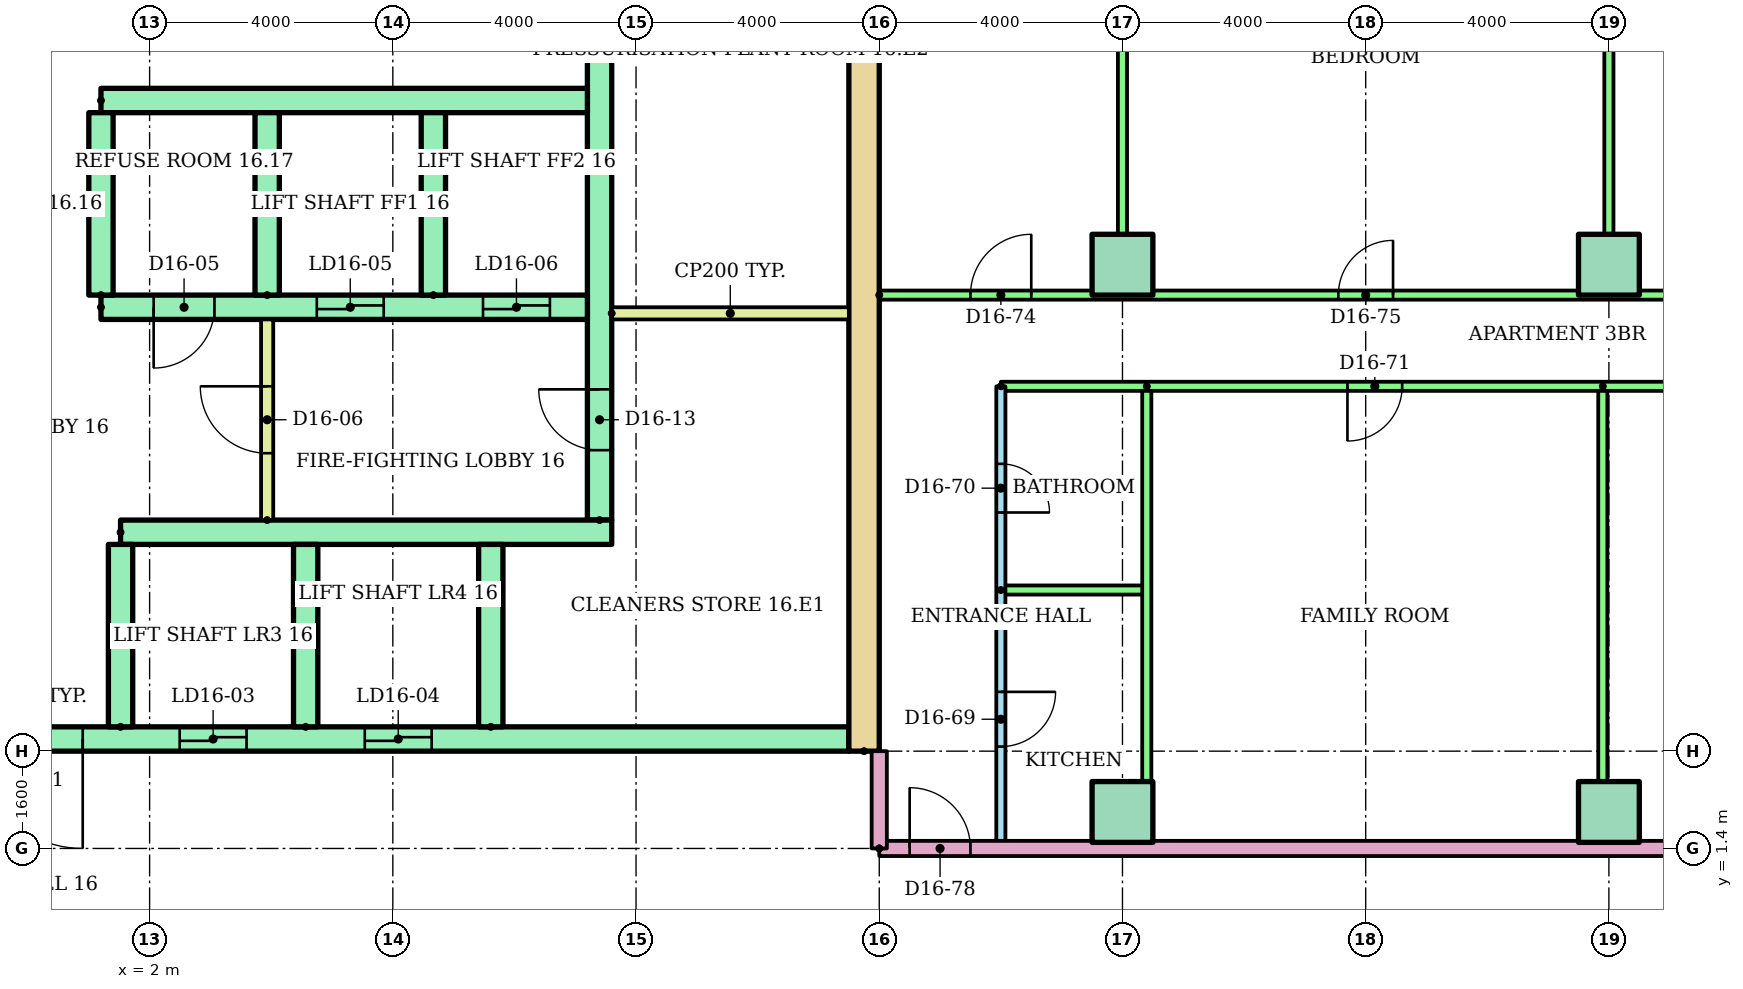
"""IFC4 building model, lengths in metres.
Left out: names, types, materials, properties, quantities, classifications, styles, units other than length and angle.
Written with IfcOpenShell. Run it as: python <this file> out.ifc"""

import sys

from ifc_helpers import new_model, si_unit, direction, frame, frame_2d, origin, origin_2d, place, context, subcontext, project, spatial, rectangle, extrude, element, fill, save


model = new_model("IFC4")
c1 = context("Model", 3, precision=1e-05, world=origin(), true_north=direction((0.0, 1.0)))
c2 = subcontext(c1, "Body", "Model", "MODEL_VIEW")
j1 = project(units=[si_unit("LENGTHUNIT", "METRE"), si_unit("PLANEANGLEUNIT", "RADIAN")], contexts=[c1])
p1 = place(None, origin())
s1 = spatial("IfcSite", under=j1, at=p1, CompositionType="ELEMENT")
p2 = place(p1, origin())
s2 = spatial("IfcBuilding", under=s1, at=p2, CompositionType="ELEMENT")
p3 = place(p2, frame((0.0, 0.0, 60.8)))
s3 = spatial("IfcBuildingStorey", under=s2, at=p3, CompositionType="ELEMENT", Elevation=60.8)
for number, where in (
    (1, (18.0, 2.0, 0.0)),
    (2, (26.0, 2.0, 0.0)),
    (3, (18.0, 11.0, 0.0)),
    (4, (26.0, 11.0, 0.0)),
):
    element("IfcColumn", number, at=place(p3, frame(where)), inside=s3, PredefinedType="COLUMN", context=c2, shape_type="SweptSolid", body=[
        extrude(rectangle(XDim=1.0, YDim=1.0, at=origin_2d()), origin(), (0.0, 0.0, 1.0), 3.2),
    ])
p4 = place(p3, frame((13.75, 3.0, 0.0), z_axis=(0.0, 0.0, 1.0), x_axis=(0.0, 1.0, 0.0)))
e5 = element("IfcWall", 5, at=p4, inside=s3, PredefinedType="SHEAR", context=c2, shape_type="SweptSolid", body=[
    extrude(rectangle(XDim=17.0, YDim=0.5, at=frame_2d((8.5, 0.0))), origin(), (0.0, 0.0, 1.0), 2.8),
])
p5 = place(p3, frame((9.4, 6.8, 0.0), z_axis=(0.0, 0.0, 1.0), x_axis=(0.0, 1.0, 0.0)))
e6 = element("IfcWall", 6, at=p5, inside=s3, PredefinedType="SHEAR", context=c2, shape_type="SweptSolid", body=[
    extrude(rectangle(XDim=12.7, YDim=0.4, at=frame_2d((6.35, 0.0))), origin(), (0.0, 0.0, 1.0), 2.8),
])
p6 = place(p5, frame((1.15, 0.0, 0.0)))
e7 = element("IfcOpeningElement", 7, at=p6, cuts=e6, PredefinedType="OPENING", context=c2, shape_type="SweptSolid", body=[
    extrude(rectangle(XDim=1.0, YDim=2.1, at=frame_2d((0.5, 1.05))), frame((0.0, 0.21, 0.0), z_axis=(0.0, -1.0, 0.0), x_axis=(1.0, 0.0, 0.0)), (0.0, 0.0, 1.0), 0.42),
])
p7 = place(p5, frame((7.925, 0.0, 0.0)))
e8 = element("IfcOpeningElement", 8, at=p7, cuts=e6, PredefinedType="OPENING", context=c2, shape_type="SweptSolid", body=[
    extrude(rectangle(XDim=1.0, YDim=2.1, at=frame_2d((0.5, 1.05))), frame((0.0, 0.21, 0.0), z_axis=(0.0, -1.0, 0.0), x_axis=(1.0, 0.0, 0.0)), (0.0, 0.0, 1.0), 0.42),
])
p8 = place(p3, frame((-13.5, 3.2, 0.0)))
e9 = element("IfcWall", 9, at=p8, inside=s3, PredefinedType="SHEAR", context=c2, shape_type="SweptSolid", body=[
    extrude(rectangle(XDim=27.0, YDim=0.4, at=frame_2d((13.5, 0.0))), origin(), (0.0, 0.0, 1.0), 2.8),
])
p9 = place(p8, frame((6.861, 0.0, 0.0)))
e10 = element("IfcOpeningElement", 10, at=p9, cuts=e9, PredefinedType="OPENING", context=c2, shape_type="SweptSolid", body=[
    extrude(rectangle(XDim=1.1, YDim=2.1, at=frame_2d((0.55, 1.05))), frame((0.0, 0.21, 0.0), z_axis=(0.0, -1.0, 0.0), x_axis=(1.0, 0.0, 0.0)), (0.0, 0.0, 1.0), 0.42),
])
p10 = place(p8, frame((9.906, 0.0, 0.0)))
e11 = element("IfcOpeningElement", 11, at=p10, cuts=e9, PredefinedType="OPENING", context=c2, shape_type="SweptSolid", body=[
    extrude(rectangle(XDim=1.1, YDim=2.1, at=frame_2d((0.55, 1.05))), frame((0.0, 0.21, 0.0), z_axis=(0.0, -1.0, 0.0), x_axis=(1.0, 0.0, 0.0)), (0.0, 0.0, 1.0), 0.42),
])
p11 = place(p8, frame((15.994, 0.0, 0.0)))
e12 = element("IfcOpeningElement", 12, at=p11, cuts=e9, PredefinedType="OPENING", context=c2, shape_type="SweptSolid", body=[
    extrude(rectangle(XDim=1.1, YDim=2.1, at=frame_2d((0.55, 1.05))), frame((0.0, 0.21, 0.0), z_axis=(0.0, -1.0, 0.0), x_axis=(1.0, 0.0, 0.0)), (0.0, 0.0, 1.0), 0.42),
])
p12 = place(p8, frame((19.039, 0.0, 0.0)))
e13 = element("IfcOpeningElement", 13, at=p12, cuts=e9, PredefinedType="OPENING", context=c2, shape_type="SweptSolid", body=[
    extrude(rectangle(XDim=1.1, YDim=2.1, at=frame_2d((0.55, 1.05))), frame((0.0, 0.21, 0.0), z_axis=(0.0, -1.0, 0.0), x_axis=(1.0, 0.0, 0.0)), (0.0, 0.0, 1.0), 0.42),
])
p13 = place(p8, frame((12.6, 0.0, 0.0)))
e14 = element("IfcOpeningElement", 14, at=p13, cuts=e9, PredefinedType="OPENING", context=c2, shape_type="SweptSolid", body=[
    extrude(rectangle(XDim=1.8, YDim=2.1, at=frame_2d((0.9, 1.05))), frame((0.0, 0.21, 0.0), z_axis=(0.0, -1.0, 0.0), x_axis=(1.0, 0.0, 0.0)), (0.0, 0.0, 1.0), 0.42),
])
p14 = place(p3, frame((1.522, 6.6, 0.0)))
e15 = element("IfcWall", 15, at=p14, inside=s3, PredefinedType="SHEAR", context=c2, shape_type="SweptSolid", body=[
    extrude(rectangle(XDim=8.078, YDim=0.4, at=frame_2d((4.039, 0.0))), origin(), (0.0, 0.0, 1.0), 2.8),
])
for number, where, z_axis, x_axis in (
    (16, (1.522, 3.4, 0.0), (0.0, 0.0, 1.0), (0.0, 1.0, 0.0)),
    (17, (4.567, 3.4, 0.0), (0.0, 0.0, 1.0), (0.0, 1.0, 0.0)),
    (18, (7.611, 3.4, 0.0), (0.0, 0.0, 1.0), (0.0, 1.0, 0.0)),
):
    element("IfcWall", number, at=place(p3, frame(where, z_axis=z_axis, x_axis=x_axis)), inside=s3, PredefinedType="SHEAR", context=c2, shape_type="SweptSolid", body=[
        extrude(rectangle(XDim=3.0, YDim=0.4, at=frame_2d((1.5, 0.0))), origin(), (0.0, 0.0, 1.0), 2.8),
    ])
p15 = place(p3, frame((1.2, 10.3, 0.0)))
e19 = element("IfcWall", 19, at=p15, inside=s3, PredefinedType="SHEAR", context=c2, shape_type="SweptSolid", body=[
    extrude(rectangle(XDim=8.0, YDim=0.4, at=frame_2d((4.0, 0.0))), origin(), (0.0, 0.0, 1.0), 2.8),
])
p16 = place(p15, frame((3.55, 0.0, 0.0)))
e20 = element("IfcOpeningElement", 20, at=p16, cuts=e19, PredefinedType="OPENING", context=c2, shape_type="SweptSolid", body=[
    extrude(rectangle(XDim=1.1, YDim=2.1, at=frame_2d((0.55, 1.05))), frame((0.0, 0.21, 0.0), z_axis=(0.0, -1.0, 0.0), x_axis=(1.0, 0.0, 0.0)), (0.0, 0.0, 1.0), 0.42),
])
p17 = place(p15, frame((6.283, 0.0, 0.0)))
e21 = element("IfcOpeningElement", 21, at=p17, cuts=e19, PredefinedType="OPENING", context=c2, shape_type="SweptSolid", body=[
    extrude(rectangle(XDim=1.1, YDim=2.1, at=frame_2d((0.55, 1.05))), frame((0.0, 0.21, 0.0), z_axis=(0.0, -1.0, 0.0), x_axis=(1.0, 0.0, 0.0)), (0.0, 0.0, 1.0), 0.42),
])
p18 = place(p15, frame((0.867, 0.0, 0.0)))
e22 = element("IfcOpeningElement", 22, at=p18, cuts=e19, PredefinedType="OPENING", context=c2, shape_type="SweptSolid", body=[
    extrude(rectangle(XDim=1.0, YDim=2.1, at=frame_2d((0.5, 1.05))), frame((0.0, 0.21, 0.0), z_axis=(0.0, -1.0, 0.0), x_axis=(1.0, 0.0, 0.0)), (0.0, 0.0, 1.0), 0.42),
])
p19 = place(p3, frame((1.2, 13.7, 0.0)))
e23 = element("IfcWall", 23, at=p19, inside=s3, PredefinedType="SHEAR", context=c2, shape_type="SweptSolid", body=[
    extrude(rectangle(XDim=8.0, YDim=0.4, at=frame_2d((4.0, 0.0))), origin(), (0.0, 0.0, 1.0), 2.8),
])
for number, where, z_axis, x_axis in (
    (24, (1.2, 10.5, 0.0), (0.0, 0.0, 1.0), (0.0, 1.0, 0.0)),
    (25, (3.933, 10.5, 0.0), (0.0, 0.0, 1.0), (0.0, 1.0, 0.0)),
    (26, (6.667, 10.5, 0.0), (0.0, 0.0, 1.0), (0.0, 1.0, 0.0)),
):
    element("IfcWall", number, at=place(p3, frame(where, z_axis=z_axis, x_axis=x_axis)), inside=s3, PredefinedType="SHEAR", context=c2, shape_type="SweptSolid", body=[
        extrude(rectangle(XDim=3.0, YDim=0.4, at=frame_2d((1.5, 0.0))), origin(), (0.0, 0.0, 1.0), 2.8),
    ])
p20 = place(p3, frame((3.933, 6.8, 0.0), z_axis=(0.0, 0.0, 1.0), x_axis=(0.0, 1.0, 0.0)))
e27 = element("IfcWall", 27, at=p20, inside=s3, PredefinedType="PARTITIONING", context=c2, shape_type="SweptSolid", body=[
    extrude(rectangle(XDim=3.3, YDim=0.2, at=frame_2d((1.65, 0.0))), origin(), (0.0, 0.0, 1.0), 2.8),
])
p21 = place(p20, frame((1.1, 0.0, 0.0)))
e28 = element("IfcOpeningElement", 28, at=p21, cuts=e27, PredefinedType="OPENING", context=c2, shape_type="SweptSolid", body=[
    extrude(rectangle(XDim=1.1, YDim=2.1, at=frame_2d((0.55, 1.05))), frame((0.0, 0.11, 0.0), z_axis=(0.0, -1.0, 0.0), x_axis=(1.0, 0.0, 0.0)), (0.0, 0.0, 1.0), 0.22),
])
p22 = place(p3, frame((9.6, 10.2, 0.0)))
e29 = element("IfcWall", 29, at=p22, inside=s3, PredefinedType="PARTITIONING", context=c2, shape_type="SweptSolid", body=[
    extrude(rectangle(XDim=3.9, YDim=0.2, at=frame_2d((1.95, 0.0))), origin(), (0.0, 0.0, 1.0), 2.8),
])
p23 = place(p3, frame((16.0, 9.0, 0.0), z_axis=(0.0, 0.0, 1.0), x_axis=(0.0, -1.0, 0.0)))
e30 = element("IfcWall", 30, at=p23, inside=s3, PredefinedType="PARTITIONING", context=c2, shape_type="SweptSolid", body=[
    extrude(rectangle(XDim=7.6, YDim=0.15, at=frame_2d((3.8, 0.0))), origin(), (0.0, 0.0, 1.0), 2.4),
])
p24 = place(p23, frame((5.025, 0.0, 0.0)))
e31 = element("IfcOpeningElement", 31, at=p24, cuts=e30, PredefinedType="OPENING", context=c2, shape_type="SweptSolid", body=[
    extrude(rectangle(XDim=0.9, YDim=2.1, at=frame_2d((0.45, 1.05))), frame((0.0, 0.085, 0.0), z_axis=(0.0, -1.0, 0.0), x_axis=(1.0, 0.0, 0.0)), (0.0, 0.0, 1.0), 0.17),
])
p25 = place(p23, frame((1.275, 0.0, 0.0)))
e32 = element("IfcOpeningElement", 32, at=p25, cuts=e30, PredefinedType="OPENING", context=c2, shape_type="SweptSolid", body=[
    extrude(rectangle(XDim=0.8, YDim=2.1, at=frame_2d((0.4, 1.05))), frame((0.0, 0.085, 0.0), z_axis=(0.0, -1.0, 0.0), x_axis=(1.0, 0.0, 0.0)), (0.0, 0.0, 1.0), 0.17),
])
p26 = place(p3, frame((16.0, 5.65, 0.0)))
e33 = element("IfcWall", 33, at=p26, inside=s3, PredefinedType="PARTITIONING", context=c2, shape_type="SweptSolid", body=[
    extrude(rectangle(XDim=2.4, YDim=0.15, at=frame_2d((1.2, 0.0))), origin(), (0.0, 0.0, 1.0), 2.4),
])
for number, where, z_axis, x_axis in (
    (34, (18.4, 9.0, 0.0), (0.0, 0.0, 1.0), (0.0, -1.0, 0.0)),
    (35, (25.9, 9.0, 0.0), (0.0, 0.0, 1.0), (0.0, -1.0, 0.0)),
):
    element("IfcWall", number, at=place(p3, frame(where, z_axis=z_axis, x_axis=x_axis)), inside=s3, PredefinedType="PARTITIONING", context=c2, shape_type="SweptSolid", body=[
        extrude(rectangle(XDim=7.6, YDim=0.15, at=frame_2d((3.8, 0.0))), origin(), (0.0, 0.0, 1.0), 2.4),
    ])
p27 = place(p3, frame((36.51, 9.0, 0.0), z_axis=(0.0, 0.0, 1.0), x_axis=(-1.0, 0.0, 0.0)))
e36 = element("IfcWall", 36, at=p27, inside=s3, PredefinedType="PARTITIONING", context=c2, shape_type="SweptSolid", body=[
    extrude(rectangle(XDim=20.51, YDim=0.15, at=frame_2d((10.255, 0.0))), origin(), (0.0, 0.0, 1.0), 2.4),
])
p28 = place(p27, frame((13.91, 0.0, 0.0)))
e37 = element("IfcOpeningElement", 37, at=p28, cuts=e36, PredefinedType="OPENING", context=c2, shape_type="SweptSolid", body=[
    extrude(rectangle(XDim=0.9, YDim=2.1, at=frame_2d((0.45, 1.05))), frame((0.0, 0.085, 0.0), z_axis=(0.0, -1.0, 0.0), x_axis=(1.0, 0.0, 0.0)), (0.0, 0.0, 1.0), 0.17),
])
p29 = place(p27, frame((7.16, 0.0, 0.0)))
e38 = element("IfcOpeningElement", 38, at=p29, cuts=e36, PredefinedType="OPENING", context=c2, shape_type="SweptSolid", body=[
    extrude(rectangle(XDim=0.9, YDim=2.1, at=frame_2d((0.45, 1.05))), frame((0.0, 0.085, 0.0), z_axis=(0.0, -1.0, 0.0), x_axis=(1.0, 0.0, 0.0)), (0.0, 0.0, 1.0), 0.17),
])
p30 = place(p27, frame((0.85, 0.0, 0.0)))
e39 = element("IfcOpeningElement", 39, at=p30, cuts=e36, PredefinedType="OPENING", context=c2, shape_type="SweptSolid", body=[
    extrude(rectangle(XDim=0.9, YDim=2.1, at=frame_2d((0.45, 1.05))), frame((0.0, 0.085, 0.0), z_axis=(0.0, -1.0, 0.0), x_axis=(1.0, 0.0, 0.0)), (0.0, 0.0, 1.0), 0.17),
])
p31 = place(p3, frame((14.0, 10.5, 0.0)))
e40 = element("IfcWall", 40, at=p31, inside=s3, PredefinedType="PARTITIONING", context=c2, shape_type="SweptSolid", body=[
    extrude(rectangle(XDim=22.51, YDim=0.15, at=frame_2d((11.255, 0.0))), origin(), (0.0, 0.0, 1.0), 2.4),
])
p32 = place(p31, frame((1.5, 0.0, 0.0)))
e41 = element("IfcOpeningElement", 41, at=p32, cuts=e40, PredefinedType="OPENING", context=c2, shape_type="SweptSolid", body=[
    extrude(rectangle(XDim=1.0, YDim=2.1, at=frame_2d((0.5, 1.05))), frame((0.0, 0.085, 0.0), z_axis=(0.0, -1.0, 0.0), x_axis=(1.0, 0.0, 0.0)), (0.0, 0.0, 1.0), 0.17),
])
p33 = place(p31, frame((7.55, 0.0, 0.0)))
e42 = element("IfcOpeningElement", 42, at=p33, cuts=e40, PredefinedType="OPENING", context=c2, shape_type="SweptSolid", body=[
    extrude(rectangle(XDim=0.9, YDim=2.1, at=frame_2d((0.45, 1.05))), frame((0.0, 0.085, 0.0), z_axis=(0.0, -1.0, 0.0), x_axis=(1.0, 0.0, 0.0)), (0.0, 0.0, 1.0), 0.17),
])
p34 = place(p31, frame((14.45, 0.0, 0.0)))
e43 = element("IfcOpeningElement", 43, at=p34, cuts=e40, PredefinedType="OPENING", context=c2, shape_type="SweptSolid", body=[
    extrude(rectangle(XDim=0.9, YDim=2.1, at=frame_2d((0.45, 1.05))), frame((0.0, 0.085, 0.0), z_axis=(0.0, -1.0, 0.0), x_axis=(1.0, 0.0, 0.0)), (0.0, 0.0, 1.0), 0.17),
])
p35 = place(p31, frame((20.76, 0.0, 0.0)))
e44 = element("IfcOpeningElement", 44, at=p35, cuts=e40, PredefinedType="OPENING", context=c2, shape_type="SweptSolid", body=[
    extrude(rectangle(XDim=0.9, YDim=2.1, at=frame_2d((0.45, 1.05))), frame((0.0, 0.085, 0.0), z_axis=(0.0, -1.0, 0.0), x_axis=(1.0, 0.0, 0.0)), (0.0, 0.0, 1.0), 0.17),
])
for number, where, z_axis, x_axis in (
    (45, (18.0, 18.521, 0.0), (0.0, 0.0, 1.0), (0.0, -1.0, 0.0)),
    (46, (26.0, 18.521, 0.0), (0.0, 0.0, 1.0), (0.0, -1.0, 0.0)),
):
    element("IfcWall", number, at=place(p3, frame(where, z_axis=z_axis, x_axis=x_axis)), inside=s3, PredefinedType="PARTITIONING", context=c2, shape_type="SweptSolid", body=[
        extrude(rectangle(XDim=8.021, YDim=0.15, at=frame_2d((4.01, 0.0))), origin(), (0.0, 0.0, 1.0), 2.4),
    ])
p36 = place(p3, frame((14.0, 1.4, 0.0)))
e47 = element("IfcWall", 47, at=p36, inside=s3, PredefinedType="PARTITIONING", context=c2, shape_type="SweptSolid", body=[
    extrude(rectangle(XDim=15.0, YDim=0.25, at=frame_2d((7.5, 0.0))), origin(), (0.0, 0.0, 1.0), 2.4),
])
p37 = place(p36, frame((0.5, 0.0, 0.0)))
e48 = element("IfcOpeningElement", 48, at=p37, cuts=e47, PredefinedType="OPENING", context=c2, shape_type="SweptSolid", body=[
    extrude(rectangle(XDim=1.0, YDim=2.1, at=frame_2d((0.5, 1.05))), frame((0.0, 0.135, 0.0), z_axis=(0.0, -1.0, 0.0), x_axis=(1.0, 0.0, 0.0)), (0.0, 0.0, 1.0), 0.27),
])
p38 = place(p3, frame((14.0, 1.4, 0.0), z_axis=(0.0, 0.0, 1.0), x_axis=(0.0, 1.0, 0.0)))
e49 = element("IfcWall", 49, at=p38, inside=s3, PredefinedType="PARTITIONING", context=c2, shape_type="SweptSolid", body=[
    extrude(rectangle(XDim=1.6, YDim=0.25, at=frame_2d((0.8, 0.0))), origin(), (0.0, 0.0, 1.0), 2.4),
])
p39 = place(p11, origin())
e50 = element("IfcDoor", 50, at=p39, inside=s3, OperationType="SLIDING_TO_LEFT", PredefinedType="DOOR", context=c2, shape_type="SweptSolid", body=[
    extrude(rectangle(XDim=1.1, YDim=2.1, at=frame_2d((0.55, 1.05))), frame((0.0, 0.025, 0.0), z_axis=(0.0, -1.0, 0.0), x_axis=(1.0, 0.0, 0.0)), (0.0, 0.0, 1.0), 0.05),
])
fill(e12, e50)
p40 = place(p12, origin())
e51 = element("IfcDoor", 51, at=p40, inside=s3, OperationType="SLIDING_TO_LEFT", PredefinedType="DOOR", context=c2, shape_type="SweptSolid", body=[
    extrude(rectangle(XDim=1.1, YDim=2.1, at=frame_2d((0.55, 1.05))), frame((0.0, 0.025, 0.0), z_axis=(0.0, -1.0, 0.0), x_axis=(1.0, 0.0, 0.0)), (0.0, 0.0, 1.0), 0.05),
])
fill(e13, e51)
p41 = place(p13, frame((1.8, 0.0, 0.0), z_axis=(0.0, 0.0, 1.0), x_axis=(-1.0, 0.0, 0.0)))
e52 = element("IfcDoor", 52, at=p41, inside=s3, OperationType="DOUBLE_DOOR_SINGLE_SWING", PredefinedType="DOOR", context=c2, shape_type="SweptSolid", body=[
    extrude(rectangle(XDim=1.8, YDim=2.1, at=frame_2d((0.9, 1.05))), frame((0.0, 0.025, 0.0), z_axis=(0.0, -1.0, 0.0), x_axis=(1.0, 0.0, 0.0)), (0.0, 0.0, 1.0), 0.05),
])
fill(e14, e52)
p42 = place(p16, origin())
e53 = element("IfcDoor", 53, at=p42, inside=s3, OperationType="SLIDING_TO_LEFT", PredefinedType="DOOR", context=c2, shape_type="SweptSolid", body=[
    extrude(rectangle(XDim=1.1, YDim=2.1, at=frame_2d((0.55, 1.05))), frame((0.0, 0.025, 0.0), z_axis=(0.0, -1.0, 0.0), x_axis=(1.0, 0.0, 0.0)), (0.0, 0.0, 1.0), 0.05),
])
fill(e20, e53)
p43 = place(p17, origin())
e54 = element("IfcDoor", 54, at=p43, inside=s3, OperationType="SLIDING_TO_LEFT", PredefinedType="DOOR", context=c2, shape_type="SweptSolid", body=[
    extrude(rectangle(XDim=1.1, YDim=2.1, at=frame_2d((0.55, 1.05))), frame((0.0, 0.025, 0.0), z_axis=(0.0, -1.0, 0.0), x_axis=(1.0, 0.0, 0.0)), (0.0, 0.0, 1.0), 0.05),
])
fill(e21, e54)
p44 = place(p18, frame((1.0, 0.0, 0.0), z_axis=(0.0, 0.0, 1.0), x_axis=(-1.0, 0.0, 0.0)))
e55 = element("IfcDoor", 55, at=p44, inside=s3, OperationType="SINGLE_SWING_LEFT", PredefinedType="DOOR", context=c2, shape_type="SweptSolid", body=[
    extrude(rectangle(XDim=1.0, YDim=2.1, at=frame_2d((0.5, 1.05))), frame((0.0, 0.025, 0.0), z_axis=(0.0, -1.0, 0.0), x_axis=(1.0, 0.0, 0.0)), (0.0, 0.0, 1.0), 0.05),
])
fill(e22, e55)
p45 = place(p21, origin())
e56 = element("IfcDoor", 56, at=p45, inside=s3, OperationType="SINGLE_SWING_RIGHT", PredefinedType="DOOR", context=c2, shape_type="SweptSolid", body=[
    extrude(rectangle(XDim=1.1, YDim=2.1, at=frame_2d((0.55, 1.05))), frame((0.0, 0.025, 0.0), z_axis=(0.0, -1.0, 0.0), x_axis=(1.0, 0.0, 0.0)), (0.0, 0.0, 1.0), 0.05),
])
fill(e28, e56)
p46 = place(p6, origin())
e57 = element("IfcDoor", 57, at=p46, inside=s3, OperationType="SINGLE_SWING_RIGHT", PredefinedType="DOOR", context=c2, shape_type="SweptSolid", body=[
    extrude(rectangle(XDim=1.0, YDim=2.1, at=frame_2d((0.5, 1.05))), frame((0.0, 0.025, 0.0), z_axis=(0.0, -1.0, 0.0), x_axis=(1.0, 0.0, 0.0)), (0.0, 0.0, 1.0), 0.05),
])
fill(e7, e57)
p47 = place(p24, origin())
e58 = element("IfcDoor", 58, at=p47, inside=s3, OperationType="SINGLE_SWING_LEFT", PredefinedType="DOOR", context=c2, shape_type="SweptSolid", body=[
    extrude(rectangle(XDim=0.9, YDim=2.1, at=frame_2d((0.45, 1.05))), frame((0.0, 0.025, 0.0), z_axis=(0.0, -1.0, 0.0), x_axis=(1.0, 0.0, 0.0)), (0.0, 0.0, 1.0), 0.05),
])
fill(e31, e58)
p48 = place(p25, origin())
e59 = element("IfcDoor", 59, at=p48, inside=s3, OperationType="SINGLE_SWING_RIGHT", PredefinedType="DOOR", context=c2, shape_type="SweptSolid", body=[
    extrude(rectangle(XDim=0.8, YDim=2.1, at=frame_2d((0.4, 1.05))), frame((0.0, 0.025, 0.0), z_axis=(0.0, -1.0, 0.0), x_axis=(1.0, 0.0, 0.0)), (0.0, 0.0, 1.0), 0.05),
])
fill(e32, e59)
p49 = place(p28, origin())
e60 = element("IfcDoor", 60, at=p49, inside=s3, OperationType="SINGLE_SWING_RIGHT", PredefinedType="DOOR", context=c2, shape_type="SweptSolid", body=[
    extrude(rectangle(XDim=0.9, YDim=2.1, at=frame_2d((0.45, 1.05))), frame((0.0, 0.025, 0.0), z_axis=(0.0, -1.0, 0.0), x_axis=(1.0, 0.0, 0.0)), (0.0, 0.0, 1.0), 0.05),
])
fill(e37, e60)
p50 = place(p32, origin())
e61 = element("IfcDoor", 61, at=p50, inside=s3, OperationType="SINGLE_SWING_RIGHT", PredefinedType="DOOR", context=c2, shape_type="SweptSolid", body=[
    extrude(rectangle(XDim=1.0, YDim=2.1, at=frame_2d((0.5, 1.05))), frame((0.0, 0.025, 0.0), z_axis=(0.0, -1.0, 0.0), x_axis=(1.0, 0.0, 0.0)), (0.0, 0.0, 1.0), 0.05),
])
fill(e41, e61)
p51 = place(p33, origin())
e62 = element("IfcDoor", 62, at=p51, inside=s3, OperationType="SINGLE_SWING_RIGHT", PredefinedType="DOOR", context=c2, shape_type="SweptSolid", body=[
    extrude(rectangle(XDim=0.9, YDim=2.1, at=frame_2d((0.45, 1.05))), frame((0.0, 0.025, 0.0), z_axis=(0.0, -1.0, 0.0), x_axis=(1.0, 0.0, 0.0)), (0.0, 0.0, 1.0), 0.05),
])
fill(e42, e62)
p52 = place(p37, origin())
e63 = element("IfcDoor", 63, at=p52, inside=s3, OperationType="SINGLE_SWING_LEFT", PredefinedType="DOOR", context=c2, shape_type="SweptSolid", body=[
    extrude(rectangle(XDim=1.0, YDim=2.1, at=frame_2d((0.5, 1.05))), frame((0.0, 0.025, 0.0), z_axis=(0.0, -1.0, 0.0), x_axis=(1.0, 0.0, 0.0)), (0.0, 0.0, 1.0), 0.05),
])
fill(e48, e63)
save(model, sys.argv[1])
